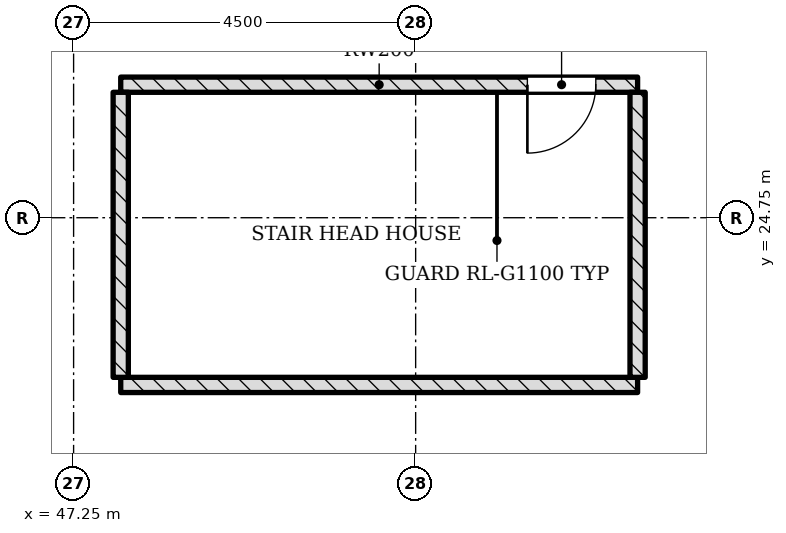
"""IFC4 building model, lengths in metres.
Left out: names, types, materials, properties, quantities, classifications, styles, units other than length and angle.
Written with IfcOpenShell. Run it as: python <this file> out.ifc"""

import sys

from ifc_helpers import new_model, si_unit, direction, frame, frame_2d, origin, place, context, subcontext, project, spatial, rectangle, extrude, element, fill, save


model = new_model("IFC4")
c1 = context("Model", 3, precision=1e-05, world=origin(), true_north=direction((0.0, 1.0)))
c2 = subcontext(c1, "Body", "Model", "MODEL_VIEW")
j1 = project(units=[si_unit("LENGTHUNIT", "METRE"), si_unit("PLANEANGLEUNIT", "RADIAN")], contexts=[c1])
p1 = place(None, origin())
s1 = spatial("IfcSite", under=j1, at=p1, CompositionType="ELEMENT")
p2 = place(p1, origin())
s2 = spatial("IfcBuilding", under=s1, at=p2, CompositionType="ELEMENT")
p3 = place(p2, frame((0.0, 0.0, 24.5)))
s3 = spatial("IfcBuildingStorey", under=s2, at=p3, CompositionType="ELEMENT", Elevation=24.5)
p4 = place(p3, frame((47.87, 26.5, 0.0), z_axis=(0.0, 0.0, 1.0), x_axis=(1.0, 0.0, 0.0)))
e1 = element("IfcWall", 1, at=p4, inside=s3, PredefinedType="SHEAR", context=c2, shape_type="SweptSolid", body=[
    extrude(rectangle(XDim=6.8, YDim=0.2, at=frame_2d((3.4, 0.0))), origin(), (0.0, 0.0, 1.0), 3.0),
])
p5 = place(p4, frame((5.35, 0.0, 0.0)))
e2 = element("IfcOpeningElement", 2, at=p5, cuts=e1, PredefinedType="OPENING", context=c2, shape_type="SweptSolid", body=[
    extrude(rectangle(XDim=0.9, YDim=2.1, at=frame_2d((0.45, 1.05))), frame((0.0, 0.11, 0.0), z_axis=(0.0, -1.0, 0.0), x_axis=(1.0, 0.0, 0.0)), (0.0, 0.0, 1.0), 0.22),
])
p6 = place(p3, frame((47.87, 22.55, 0.0), z_axis=(0.0, 0.0, 1.0), x_axis=(1.0, 0.0, 0.0)))
e3 = element("IfcWall", 3, at=p6, inside=s3, PredefinedType="SHEAR", context=c2, shape_type="SweptSolid", body=[
    extrude(rectangle(XDim=6.8, YDim=0.2, at=frame_2d((3.4, 0.0))), origin(), (0.0, 0.0, 1.0), 3.0),
])
for number, where, z_axis, x_axis in (
    (4, (47.87, 22.65, 0.0), (0.0, 0.0, 1.0), (0.0, 1.0, 0.0)),
    (5, (54.67, 22.65, 0.0), (0.0, 0.0, 1.0), (0.0, 1.0, 0.0)),
):
    element("IfcWall", number, at=place(p3, frame(where, z_axis=z_axis, x_axis=x_axis)), inside=s3, PredefinedType="SHEAR", context=c2, shape_type="SweptSolid", body=[
        extrude(rectangle(XDim=3.75, YDim=0.2, at=frame_2d((1.875, 0.0))), origin(), (0.0, 0.0, 1.0), 3.0),
    ])
p7 = place(p5, origin())
e6 = element("IfcDoor", 6, at=p7, inside=s3, OperationType="SINGLE_SWING_LEFT", PredefinedType="DOOR", context=c2, shape_type="SweptSolid", body=[
    extrude(rectangle(XDim=0.9, YDim=2.1, at=frame_2d((0.45, 1.05))), frame((0.0, 0.025, 0.0), z_axis=(0.0, -1.0, 0.0), x_axis=(1.0, 0.0, 0.0)), (0.0, 0.0, 1.0), 0.05),
])
fill(e2, e6)
save(model, sys.argv[1])
